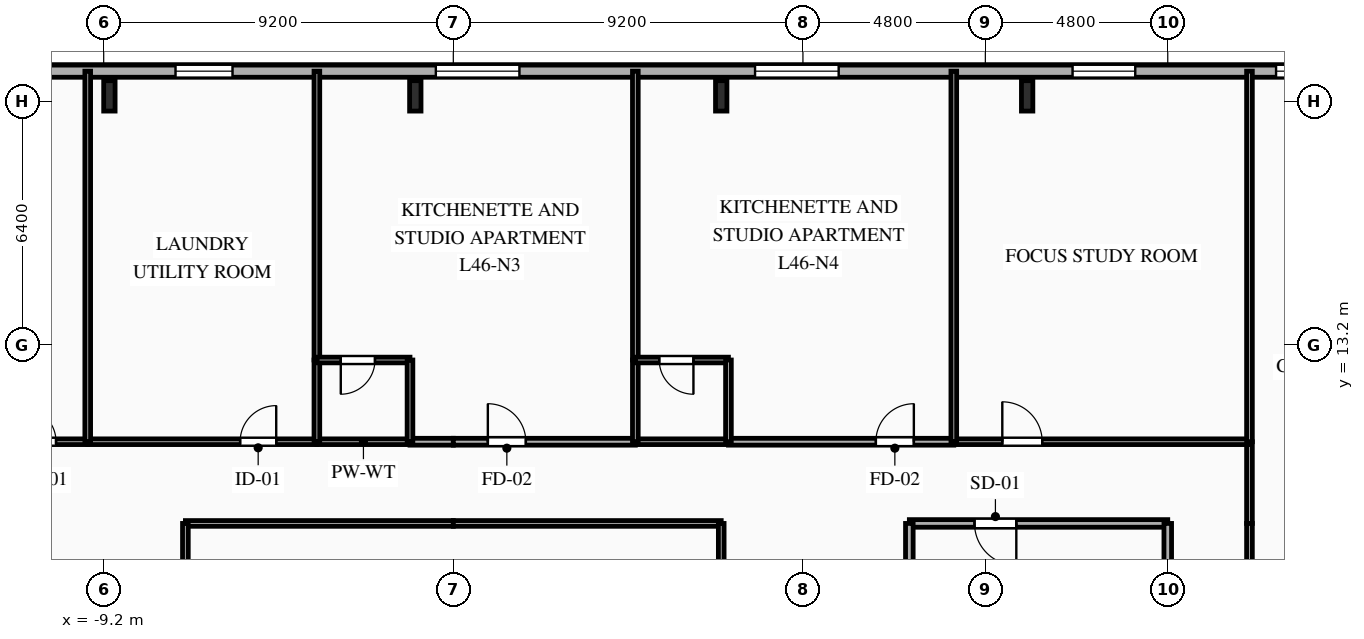
"""IFC4 building model, lengths in metres.
Left out: names, types, materials, properties, quantities, classifications, styles, units other than length and angle.
Written with IfcOpenShell. Run it as: python <this file> out.ifc"""

import sys

from ifc_helpers import new_model, si_unit, direction, frame, frame_2d, origin, origin_2d, place, context, subcontext, project, spatial, rectangle, i_section, extrude, element, fill, save


model = new_model("IFC4")
c1 = context("Model", 3, precision=1e-05, world=origin(), true_north=direction((0.0, 1.0)))
c2 = subcontext(c1, "Body", "Model", "MODEL_VIEW")
j1 = project(units=[si_unit("LENGTHUNIT", "METRE"), si_unit("PLANEANGLEUNIT", "RADIAN")], contexts=[c1])
p1 = place(None, origin())
s1 = spatial("IfcSite", under=j1, at=p1, CompositionType="ELEMENT")
p2 = place(p1, origin())
s2 = spatial("IfcBuilding", under=s1, at=p2, CompositionType="ELEMENT")
p3 = place(p2, frame((0.0, 0.0, 164.5)))
s3 = spatial("IfcBuildingStorey", under=s2, at=p3, CompositionType="ELEMENT", Elevation=164.5)
for number, where, z_axis, x_axis in (
    (1, (15.1, 19.75, 0.0), (0.0, 0.0, 1.0), (1.0, 0.0, 0.0)),
    (2, (7.05, 19.75, 0.0), (0.0, 0.0, 1.0), (1.0, 0.0, 0.0)),
    (3, (-1.0, 19.75, 0.0), (0.0, 0.0, 1.0), (1.0, 0.0, 0.0)),
    (4, (-9.05, 19.75, 0.0), (0.0, 0.0, 1.0), (1.0, 0.0, 0.0)),
):
    element("IfcColumn", number, at=place(p3, frame(where, z_axis=z_axis, x_axis=x_axis)), inside=s3, PredefinedType="COLUMN", context=c2, shape_type="SweptSolid", body=[
        extrude(i_section(OverallWidth=0.3, OverallDepth=0.8, WebThickness=0.018, FlangeThickness=0.033, FilletRadius=0.03, at=origin_2d()), origin(), (0.0, 0.0, 1.0), 3.35),
    ])
p4 = place(p3, frame((-25.8, 20.4, 0.0), z_axis=(0.0, 0.0, 1.0), x_axis=(1.0, 0.0, 0.0)))
e5 = element("IfcWall", 5, at=p4, inside=s3, PredefinedType="SOLIDWALL", context=c2, shape_type="SweptSolid", body=[
    extrude(rectangle(XDim=49.6, YDim=0.32, at=frame_2d((24.8, 0.0))), origin(), (0.0, 0.0, 1.0), 3.04),
])
p5 = place(p4, frame((2.135, 0.0, 0.85)))
e6 = element("IfcOpeningElement", 6, at=p5, cuts=e5, PredefinedType="OPENING", context=c2, shape_type="SweptSolid", body=[
    extrude(rectangle(XDim=1.65, YDim=1.85, at=frame_2d((0.825, 0.925))), frame((0.0, 0.17, 0.0), z_axis=(0.0, -1.0, 0.0), x_axis=(1.0, 0.0, 0.0)), (0.0, 0.0, 1.0), 0.34),
])
p6 = place(p4, frame((6.295, 0.0, 0.85)))
e7 = element("IfcOpeningElement", 7, at=p6, cuts=e5, PredefinedType="OPENING", context=c2, shape_type="SweptSolid", body=[
    extrude(rectangle(XDim=1.65, YDim=1.85, at=frame_2d((0.825, 0.925))), frame((0.0, 0.17, 0.0), z_axis=(0.0, -1.0, 0.0), x_axis=(1.0, 0.0, 0.0)), (0.0, 0.0, 1.0), 0.34),
])
p7 = place(p4, frame((10.775, 0.0, 0.85)))
e8 = element("IfcOpeningElement", 8, at=p7, cuts=e5, PredefinedType="OPENING", context=c2, shape_type="SweptSolid", body=[
    extrude(rectangle(XDim=1.65, YDim=1.85, at=frame_2d((0.825, 0.925))), frame((0.0, 0.17, 0.0), z_axis=(0.0, -1.0, 0.0), x_axis=(1.0, 0.0, 0.0)), (0.0, 0.0, 1.0), 0.34),
])
p8 = place(p4, frame((18.49, 0.0, 0.85)))
e9 = element("IfcOpeningElement", 9, at=p8, cuts=e5, PredefinedType="OPENING", context=c2, shape_type="SweptSolid", body=[
    extrude(rectangle(XDim=1.5, YDim=1.85, at=frame_2d((0.75, 0.925))), frame((0.0, 0.17, 0.0), z_axis=(0.0, -1.0, 0.0), x_axis=(1.0, 0.0, 0.0)), (0.0, 0.0, 1.0), 0.34),
])
p9 = place(p4, frame((25.34, 0.0, 0.85)))
e10 = element("IfcOpeningElement", 10, at=p9, cuts=e5, PredefinedType="OPENING", context=c2, shape_type="SweptSolid", body=[
    extrude(rectangle(XDim=2.2, YDim=1.85, at=frame_2d((1.1, 0.925))), frame((0.0, 0.17, 0.0), z_axis=(0.0, -1.0, 0.0), x_axis=(1.0, 0.0, 0.0)), (0.0, 0.0, 1.0), 0.34),
])
p10 = place(p4, frame((33.74, 0.0, 0.85)))
e11 = element("IfcOpeningElement", 11, at=p10, cuts=e5, PredefinedType="OPENING", context=c2, shape_type="SweptSolid", body=[
    extrude(rectangle(XDim=2.2, YDim=1.85, at=frame_2d((1.1, 0.925))), frame((0.0, 0.17, 0.0), z_axis=(0.0, -1.0, 0.0), x_axis=(1.0, 0.0, 0.0)), (0.0, 0.0, 1.0), 0.34),
])
p11 = place(p4, frame((42.095, 0.0, 0.85)))
e12 = element("IfcOpeningElement", 12, at=p11, cuts=e5, PredefinedType="OPENING", context=c2, shape_type="SweptSolid", body=[
    extrude(rectangle(XDim=1.65, YDim=1.85, at=frame_2d((0.825, 0.925))), frame((0.0, 0.17, 0.0), z_axis=(0.0, -1.0, 0.0), x_axis=(1.0, 0.0, 0.0)), (0.0, 0.0, 1.0), 0.34),
])
p12 = place(p4, frame((47.45, 0.0, 0.85)))
e13 = element("IfcOpeningElement", 13, at=p12, cuts=e5, PredefinedType="OPENING", context=c2, shape_type="SweptSolid", body=[
    extrude(rectangle(XDim=1.1, YDim=1.85, at=frame_2d((0.55, 0.925))), frame((0.0, 0.17, 0.0), z_axis=(0.0, -1.0, 0.0), x_axis=(1.0, 0.0, 0.0)), (0.0, 0.0, 1.0), 0.34),
])
p13 = place(p3, frame((18.8, 8.5, 0.0), z_axis=(0.0, 0.0, 1.0), x_axis=(-1.0, 0.0, 0.0)))
e14 = element("IfcWall", 14, at=p13, inside=s3, PredefinedType="PARTITIONING", context=c2, shape_type="SweptSolid", body=[
    extrude(rectangle(XDim=6.8, YDim=0.2, at=frame_2d((3.4, 0.0))), origin(), (0.0, 0.0, 1.0), 3.04),
])
p14 = place(p13, frame((3.985, 0.0, 0.0)))
e15 = element("IfcOpeningElement", 15, at=p14, cuts=e14, PredefinedType="OPENING", context=c2, shape_type="SweptSolid", body=[
    extrude(rectangle(XDim=1.1, YDim=2.15, at=frame_2d((0.55, 1.075))), frame((0.0, 0.11, 0.0), z_axis=(0.0, -1.0, 0.0), x_axis=(1.0, 0.0, 0.0)), (0.0, 0.0, 1.0), 0.22),
])
p15 = place(p3, frame((18.8, 5.6, 0.0), z_axis=(0.0, 0.0, 1.0), x_axis=(0.0, 1.0, 0.0)))
e16 = element("IfcWall", 16, at=p15, inside=s3, PredefinedType="PARTITIONING", context=c2, shape_type="SweptSolid", body=[
    extrude(rectangle(XDim=2.9, YDim=0.2, at=frame_2d((1.45, 0.0))), origin(), (0.0, 0.0, 1.0), 2.525),
])
p16 = place(p3, frame((12.0, 8.5, 0.0), z_axis=(0.0, 0.0, 1.0), x_axis=(0.0, -1.0, 0.0)))
e17 = element("IfcWall", 17, at=p16, inside=s3, PredefinedType="PARTITIONING", context=c2, shape_type="SweptSolid", body=[
    extrude(rectangle(XDim=2.9, YDim=0.2, at=frame_2d((1.45, 0.0))), origin(), (0.0, 0.0, 1.0), 3.04),
])
p17 = place(p3, frame((-11.97, 10.65, 0.0), z_axis=(0.0, 0.0, 1.0), x_axis=(1.0, 0.0, 0.0)))
e18 = element("IfcWall", 18, at=p17, inside=s3, PredefinedType="PLUMBINGWALL", context=c2, shape_type="SweptSolid", body=[
    extrude(rectangle(XDim=2.35, YDim=0.15, at=frame_2d((1.175, 0.0))), origin(), (0.0, 0.0, 1.0), 3.04),
])
p18 = place(p17, frame((0.616, 0.0, 0.0)))
e19 = element("IfcOpeningElement", 19, at=p18, cuts=e18, PredefinedType="OPENING", context=c2, shape_type="SweptSolid", body=[
    extrude(rectangle(XDim=0.9, YDim=2.1, at=frame_2d((0.45, 1.05))), frame((0.0, 0.085, 0.0), z_axis=(0.0, -1.0, 0.0), x_axis=(1.0, 0.0, 0.0)), (0.0, 0.0, 1.0), 0.17),
])
p19 = place(p3, frame((-9.62, 10.65, 0.0), z_axis=(0.0, 0.0, 1.0), x_axis=(1.0, 0.0, 0.0)))
e20 = element("IfcWall", 20, at=p19, inside=s3, PredefinedType="PARTITIONING", context=c2, shape_type="SweptSolid", body=[
    extrude(rectangle(XDim=6.03, YDim=0.15, at=frame_2d((3.015, 0.0))), origin(), (0.0, 0.0, 1.0), 3.04),
])
p20 = place(p19, frame((4.01, 0.0, 0.0)))
e21 = element("IfcOpeningElement", 21, at=p20, cuts=e20, PredefinedType="OPENING", context=c2, shape_type="SweptSolid", body=[
    extrude(rectangle(XDim=0.95, YDim=2.1, at=frame_2d((0.475, 1.05))), frame((0.0, 0.085, 0.0), z_axis=(0.0, -1.0, 0.0), x_axis=(1.0, 0.0, 0.0)), (0.0, 0.0, 1.0), 0.17),
])
p21 = place(p3, frame((-1.14, 10.65, 0.0), z_axis=(0.0, 0.0, 1.0), x_axis=(1.0, 0.0, 0.0)))
e22 = element("IfcWall", 22, at=p21, inside=s3, PredefinedType="PARTITIONING", context=c2, shape_type="SweptSolid", body=[
    extrude(rectangle(XDim=1.14, YDim=0.18, at=frame_2d((0.57, 0.0))), origin(), (0.0, 0.0, 1.0), 3.04),
])
p22 = place(p3, frame((-3.59, 10.65, 0.0), z_axis=(0.0, 0.0, 1.0), x_axis=(1.0, 0.0, 0.0)))
e23 = element("IfcWall", 23, at=p22, inside=s3, PredefinedType="PLUMBINGWALL", context=c2, shape_type="SweptSolid", body=[
    extrude(rectangle(XDim=2.45, YDim=0.15, at=frame_2d((1.225, 0.0))), origin(), (0.0, 0.0, 1.0), 3.04),
])
p23 = place(p3, frame((0.0, 8.5, 0.0), z_axis=(0.0, 0.0, 1.0), x_axis=(-1.0, 0.0, 0.0)))
e24 = element("IfcWall", 24, at=p23, inside=s3, PredefinedType="PARTITIONING", context=c2, shape_type="SweptSolid", body=[
    extrude(rectangle(XDim=7.05, YDim=0.15, at=frame_2d((3.525, 0.0))), origin(), (0.0, 0.0, 1.0), 3.04),
])
p24 = place(p3, frame((20.95, 10.65, 0.0), z_axis=(0.0, 0.0, 1.0), x_axis=(0.0, -1.0, 0.0)))
e25 = element("IfcWall", 25, at=p24, inside=s3, PredefinedType="PARTITIONING", context=c2, shape_type="SweptSolid", body=[
    extrude(rectangle(XDim=2.15, YDim=0.15, at=frame_2d((1.075, 0.0))), origin(), (0.0, 0.0, 1.0), 3.04),
])
p25 = place(p3, frame((0.0, 10.65, 0.0), z_axis=(0.0, 0.0, 1.0), x_axis=(1.0, 0.0, 0.0)))
e26 = element("IfcWall", 26, at=p25, inside=s3, PredefinedType="PARTITIONING", context=c2, shape_type="SweptSolid", body=[
    extrude(rectangle(XDim=4.79, YDim=0.18, at=frame_2d((2.395, 0.0))), origin(), (0.0, 0.0, 1.0), 3.04),
])
p26 = place(p25, frame((0.909, 0.0, 0.0)))
e27 = element("IfcOpeningElement", 27, at=p26, cuts=e26, PredefinedType="OPENING", context=c2, shape_type="SweptSolid", body=[
    extrude(rectangle(XDim=1.0, YDim=2.15, at=frame_2d((0.5, 1.075))), frame((0.0, 0.1, 0.0), z_axis=(0.0, -1.0, 0.0), x_axis=(1.0, 0.0, 0.0)), (0.0, 0.0, 1.0), 0.2),
])
p27 = place(p3, frame((7.24, 10.65, 0.0), z_axis=(0.0, 0.0, 1.0), x_axis=(1.0, 0.0, 0.0)))
e28 = element("IfcWall", 28, at=p27, inside=s3, PredefinedType="PARTITIONING", context=c2, shape_type="SweptSolid", body=[
    extrude(rectangle(XDim=5.93, YDim=0.18, at=frame_2d((2.965, 0.0))), origin(), (0.0, 0.0, 1.0), 3.04),
])
p28 = place(p27, frame((3.879, 0.0, 0.0)))
e29 = element("IfcOpeningElement", 29, at=p28, cuts=e28, PredefinedType="OPENING", context=c2, shape_type="SweptSolid", body=[
    extrude(rectangle(XDim=1.0, YDim=2.15, at=frame_2d((0.5, 1.075))), frame((0.0, 0.1, 0.0), z_axis=(0.0, -1.0, 0.0), x_axis=(1.0, 0.0, 0.0)), (0.0, 0.0, 1.0), 0.2),
])
p29 = place(p3, frame((4.79, 10.65, 0.0), z_axis=(0.0, 0.0, 1.0), x_axis=(1.0, 0.0, 0.0)))
e30 = element("IfcWall", 30, at=p29, inside=s3, PredefinedType="PLUMBINGWALL", context=c2, shape_type="SweptSolid", body=[
    extrude(rectangle(XDim=2.45, YDim=0.15, at=frame_2d((1.225, 0.0))), origin(), (0.0, 0.0, 1.0), 3.04),
])
p30 = place(p3, frame((13.17, 10.65, 0.0), z_axis=(0.0, 0.0, 1.0), x_axis=(1.0, 0.0, 0.0)))
e31 = element("IfcWall", 31, at=p30, inside=s3, PredefinedType="PARTITIONING", context=c2, shape_type="SweptSolid", body=[
    extrude(rectangle(XDim=7.78, YDim=0.15, at=frame_2d((3.89, 0.0))), origin(), (0.0, 0.0, 1.0), 3.04),
])
p31 = place(p30, frame((1.276, 0.0, 0.0)))
e32 = element("IfcOpeningElement", 32, at=p31, cuts=e31, PredefinedType="OPENING", context=c2, shape_type="SweptSolid", body=[
    extrude(rectangle(XDim=1.05, YDim=2.15, at=frame_2d((0.525, 1.075))), frame((0.0, 0.085, 0.0), z_axis=(0.0, -1.0, 0.0), x_axis=(1.0, 0.0, 0.0)), (0.0, 0.0, 1.0), 0.17),
])
p32 = place(p3, frame((7.05, 8.5, 0.0), z_axis=(0.0, 0.0, 1.0), x_axis=(-1.0, 0.0, 0.0)))
e33 = element("IfcWall", 33, at=p32, inside=s3, PredefinedType="PARTITIONING", context=c2, shape_type="SweptSolid", body=[
    extrude(rectangle(XDim=7.05, YDim=0.15, at=frame_2d((3.525, 0.0))), origin(), (0.0, 0.0, 1.0), 3.04),
])
p33 = place(p3, frame((20.95, 8.5, 0.0), z_axis=(0.0, 0.0, 1.0), x_axis=(0.0, -1.0, 0.0)))
e34 = element("IfcWall", 34, at=p33, inside=s3, PredefinedType="PARTITIONING", context=c2, shape_type="SweptSolid", body=[
    extrude(rectangle(XDim=6.1, YDim=0.15, at=frame_2d((3.05, 0.0))), origin(), (0.0, 0.0, 1.0), 3.04),
])
p34 = place(p33, frame((3.984, 0.0, 0.0)))
e35 = element("IfcOpeningElement", 35, at=p34, cuts=e34, PredefinedType="OPENING", context=c2, shape_type="SweptSolid", body=[
    extrude(rectangle(XDim=1.05, YDim=2.15, at=frame_2d((0.525, 1.075))), frame((0.0, 0.085, 0.0), z_axis=(0.0, -1.0, 0.0), x_axis=(1.0, 0.0, 0.0)), (0.0, 0.0, 1.0), 0.17),
])
for number, where, z_axis, x_axis in (
    (36, (-7.05, 8.5, 0.0), (0.0, 0.0, 1.0), (0.0, -1.0, 0.0)),
    (37, (7.05, -0.8, 0.0), (0.0, 0.0, 1.0), (0.0, 1.0, 0.0)),
):
    element("IfcWall", number, at=place(p3, frame(where, z_axis=z_axis, x_axis=x_axis)), inside=s3, PredefinedType="PARTITIONING", context=c2, shape_type="SweptSolid", body=[
        extrude(rectangle(XDim=9.3, YDim=0.15, at=frame_2d((4.65, 0.0))), origin(), (0.0, 0.0, 1.0), 3.04),
    ])
p35 = place(p3, frame((20.95, 10.65, 0.0), z_axis=(0.0, 0.0, 1.0), x_axis=(0.0, 1.0, 0.0)))
e38 = element("IfcWall", 38, at=p35, inside=s3, PredefinedType="PARTITIONING", context=c2, shape_type="SweptSolid", body=[
    extrude(rectangle(XDim=9.75, YDim=0.15, at=frame_2d((4.875, 0.0))), origin(), (0.0, 0.0, 1.0), 2.525),
])
p36 = place(p3, frame((-9.62, 20.4, 0.0), z_axis=(0.0, 0.0, 1.0), x_axis=(0.0, -1.0, 0.0)))
e39 = element("IfcWall", 39, at=p36, inside=s3, PredefinedType="PLUMBINGWALL", context=c2, shape_type="SweptSolid", body=[
    extrude(rectangle(XDim=9.75, YDim=0.15, at=frame_2d((4.875, 0.0))), origin(), (0.0, 0.0, 1.0), 3.04),
])
p37 = place(p3, frame((-3.59, 20.4, 0.0), z_axis=(0.0, 0.0, 1.0), x_axis=(0.0, -1.0, 0.0)))
e40 = element("IfcWall", 40, at=p37, inside=s3, PredefinedType="PARTITIONING", context=c2, shape_type="SweptSolid", body=[
    extrude(rectangle(XDim=7.6, YDim=0.15, at=frame_2d((3.8, 0.0))), origin(), (0.0, 0.0, 1.0), 3.04),
])
p38 = place(p3, frame((-3.59, 12.8, 0.0), z_axis=(0.0, 0.0, 1.0), x_axis=(0.0, -1.0, 0.0)))
e41 = element("IfcWall", 41, at=p38, inside=s3, PredefinedType="PLUMBINGWALL", context=c2, shape_type="SweptSolid", body=[
    extrude(rectangle(XDim=2.15, YDim=0.15, at=frame_2d((1.075, 0.0))), origin(), (0.0, 0.0, 1.0), 3.04),
])
p39 = place(p3, frame((-1.14, 12.8, 0.0), z_axis=(0.0, 0.0, 1.0), x_axis=(-1.0, 0.0, 0.0)))
e42 = element("IfcWall", 42, at=p39, inside=s3, PredefinedType="PLUMBINGWALL", context=c2, shape_type="SweptSolid", body=[
    extrude(rectangle(XDim=2.45, YDim=0.15, at=frame_2d((1.225, 0.0))), origin(), (0.0, 0.0, 1.0), 3.04),
])
p40 = place(p39, frame((0.921, 0.0, 0.0)))
e43 = element("IfcOpeningElement", 43, at=p40, cuts=e42, PredefinedType="OPENING", context=c2, shape_type="SweptSolid", body=[
    extrude(rectangle(XDim=0.9, YDim=2.1, at=frame_2d((0.45, 1.05))), frame((0.0, 0.085, 0.0), z_axis=(0.0, -1.0, 0.0), x_axis=(1.0, 0.0, 0.0)), (0.0, 0.0, 1.0), 0.17),
])
p41 = place(p3, frame((-1.14, 10.65, 0.0), z_axis=(0.0, 0.0, 1.0), x_axis=(0.0, 1.0, 0.0)))
e44 = element("IfcWall", 44, at=p41, inside=s3, PredefinedType="PLUMBINGWALL", context=c2, shape_type="SweptSolid", body=[
    extrude(rectangle(XDim=2.15, YDim=0.15, at=frame_2d((1.075, 0.0))), origin(), (0.0, 0.0, 1.0), 3.04),
])
p42 = place(p3, frame((4.79, 20.4, 0.0), z_axis=(0.0, 0.0, 1.0), x_axis=(0.0, -1.0, 0.0)))
e45 = element("IfcWall", 45, at=p42, inside=s3, PredefinedType="PARTITIONING", context=c2, shape_type="SweptSolid", body=[
    extrude(rectangle(XDim=7.6, YDim=0.15, at=frame_2d((3.8, 0.0))), origin(), (0.0, 0.0, 1.0), 3.04),
])
p43 = place(p3, frame((4.79, 12.8, 0.0), z_axis=(0.0, 0.0, 1.0), x_axis=(0.0, -1.0, 0.0)))
e46 = element("IfcWall", 46, at=p43, inside=s3, PredefinedType="PLUMBINGWALL", context=c2, shape_type="SweptSolid", body=[
    extrude(rectangle(XDim=2.15, YDim=0.15, at=frame_2d((1.075, 0.0))), origin(), (0.0, 0.0, 1.0), 3.04),
])
p44 = place(p3, frame((7.24, 12.8, 0.0), z_axis=(0.0, 0.0, 1.0), x_axis=(-1.0, 0.0, 0.0)))
e47 = element("IfcWall", 47, at=p44, inside=s3, PredefinedType="PLUMBINGWALL", context=c2, shape_type="SweptSolid", body=[
    extrude(rectangle(XDim=2.45, YDim=0.15, at=frame_2d((1.225, 0.0))), origin(), (0.0, 0.0, 1.0), 3.04),
])
p45 = place(p44, frame((0.921, 0.0, 0.0)))
e48 = element("IfcOpeningElement", 48, at=p45, cuts=e47, PredefinedType="OPENING", context=c2, shape_type="SweptSolid", body=[
    extrude(rectangle(XDim=0.9, YDim=2.1, at=frame_2d((0.45, 1.05))), frame((0.0, 0.085, 0.0), z_axis=(0.0, -1.0, 0.0), x_axis=(1.0, 0.0, 0.0)), (0.0, 0.0, 1.0), 0.17),
])
p46 = place(p3, frame((7.24, 10.65, 0.0), z_axis=(0.0, 0.0, 1.0), x_axis=(0.0, 1.0, 0.0)))
e49 = element("IfcWall", 49, at=p46, inside=s3, PredefinedType="PLUMBINGWALL", context=c2, shape_type="SweptSolid", body=[
    extrude(rectangle(XDim=2.15, YDim=0.15, at=frame_2d((1.075, 0.0))), origin(), (0.0, 0.0, 1.0), 3.04),
])
p47 = place(p3, frame((13.17, 20.4, 0.0), z_axis=(0.0, 0.0, 1.0), x_axis=(0.0, -1.0, 0.0)))
e50 = element("IfcWall", 50, at=p47, inside=s3, PredefinedType="PARTITIONING", context=c2, shape_type="SweptSolid", body=[
    extrude(rectangle(XDim=9.75, YDim=0.15, at=frame_2d((4.875, 0.0))), origin(), (0.0, 0.0, 1.0), 3.04),
])
p48 = place(p8, origin())
e51 = element("IfcWindow", 51, at=p48, inside=s3, PartitioningType="SINGLE_PANEL", PredefinedType="WINDOW", context=c2, shape_type="SweptSolid", body=[
    extrude(rectangle(XDim=1.5, YDim=1.85, at=frame_2d((0.75, 0.925))), frame((0.0, 0.03, 0.0), z_axis=(0.0, -1.0, 0.0), x_axis=(1.0, 0.0, 0.0)), (0.0, 0.0, 1.0), 0.06),
])
fill(e9, e51)
p49 = place(p9, origin())
e52 = element("IfcWindow", 52, at=p49, inside=s3, PartitioningType="SINGLE_PANEL", PredefinedType="WINDOW", context=c2, shape_type="SweptSolid", body=[
    extrude(rectangle(XDim=2.2, YDim=1.85, at=frame_2d((1.1, 0.925))), frame((0.0, 0.03, 0.0), z_axis=(0.0, -1.0, 0.0), x_axis=(1.0, 0.0, 0.0)), (0.0, 0.0, 1.0), 0.06),
])
fill(e10, e52)
p50 = place(p10, origin())
e53 = element("IfcWindow", 53, at=p50, inside=s3, PartitioningType="SINGLE_PANEL", PredefinedType="WINDOW", context=c2, shape_type="SweptSolid", body=[
    extrude(rectangle(XDim=2.2, YDim=1.85, at=frame_2d((1.1, 0.925))), frame((0.0, 0.03, 0.0), z_axis=(0.0, -1.0, 0.0), x_axis=(1.0, 0.0, 0.0)), (0.0, 0.0, 1.0), 0.06),
])
fill(e11, e53)
p51 = place(p11, origin())
e54 = element("IfcWindow", 54, at=p51, inside=s3, PartitioningType="SINGLE_PANEL", PredefinedType="WINDOW", context=c2, shape_type="SweptSolid", body=[
    extrude(rectangle(XDim=1.65, YDim=1.85, at=frame_2d((0.825, 0.925))), frame((0.0, 0.03, 0.0), z_axis=(0.0, -1.0, 0.0), x_axis=(1.0, 0.0, 0.0)), (0.0, 0.0, 1.0), 0.06),
])
fill(e12, e54)
p52 = place(p12, origin())
e55 = element("IfcWindow", 55, at=p52, inside=s3, PartitioningType="SINGLE_PANEL", PredefinedType="WINDOW", context=c2, shape_type="SweptSolid", body=[
    extrude(rectangle(XDim=1.1, YDim=1.85, at=frame_2d((0.55, 0.925))), frame((0.0, 0.03, 0.0), z_axis=(0.0, -1.0, 0.0), x_axis=(1.0, 0.0, 0.0)), (0.0, 0.0, 1.0), 0.06),
])
fill(e13, e55)
p53 = place(p14, origin())
e56 = element("IfcDoor", 56, at=p53, inside=s3, OperationType="SINGLE_SWING_LEFT", PredefinedType="DOOR", context=c2, shape_type="SweptSolid", body=[
    extrude(rectangle(XDim=1.1, YDim=2.15, at=frame_2d((0.55, 1.075))), frame((0.0, 0.025, 0.0), z_axis=(0.0, -1.0, 0.0), x_axis=(1.0, 0.0, 0.0)), (0.0, 0.0, 1.0), 0.05),
])
fill(e15, e56)
p54 = place(p18, origin())
e57 = element("IfcDoor", 57, at=p54, inside=s3, OperationType="SINGLE_SWING_LEFT", PredefinedType="DOOR", context=c2, shape_type="SweptSolid", body=[
    extrude(rectangle(XDim=0.9, YDim=2.1, at=frame_2d((0.45, 1.05))), frame((0.0, 0.025, 0.0), z_axis=(0.0, -1.0, 0.0), x_axis=(1.0, 0.0, 0.0)), (0.0, 0.0, 1.0), 0.05),
])
fill(e19, e57)
p55 = place(p20, origin())
e58 = element("IfcDoor", 58, at=p55, inside=s3, OperationType="SINGLE_SWING_RIGHT", PredefinedType="DOOR", context=c2, shape_type="SweptSolid", body=[
    extrude(rectangle(XDim=0.95, YDim=2.1, at=frame_2d((0.475, 1.05))), frame((0.0, 0.025, 0.0), z_axis=(0.0, -1.0, 0.0), x_axis=(1.0, 0.0, 0.0)), (0.0, 0.0, 1.0), 0.05),
])
fill(e21, e58)
p56 = place(p26, origin())
e59 = element("IfcDoor", 59, at=p56, inside=s3, OperationType="SINGLE_SWING_LEFT", PredefinedType="DOOR", context=c2, shape_type="SweptSolid", body=[
    extrude(rectangle(XDim=1.0, YDim=2.15, at=frame_2d((0.5, 1.075))), frame((0.0, 0.025, 0.0), z_axis=(0.0, -1.0, 0.0), x_axis=(1.0, 0.0, 0.0)), (0.0, 0.0, 1.0), 0.05),
])
fill(e27, e59)
p57 = place(p28, origin())
e60 = element("IfcDoor", 60, at=p57, inside=s3, OperationType="SINGLE_SWING_RIGHT", PredefinedType="DOOR", context=c2, shape_type="SweptSolid", body=[
    extrude(rectangle(XDim=1.0, YDim=2.15, at=frame_2d((0.5, 1.075))), frame((0.0, 0.025, 0.0), z_axis=(0.0, -1.0, 0.0), x_axis=(1.0, 0.0, 0.0)), (0.0, 0.0, 1.0), 0.05),
])
fill(e29, e60)
p58 = place(p31, origin())
e61 = element("IfcDoor", 61, at=p58, inside=s3, OperationType="SINGLE_SWING_LEFT", PredefinedType="DOOR", context=c2, shape_type="SweptSolid", body=[
    extrude(rectangle(XDim=1.05, YDim=2.15, at=frame_2d((0.525, 1.075))), frame((0.0, 0.025, 0.0), z_axis=(0.0, -1.0, 0.0), x_axis=(1.0, 0.0, 0.0)), (0.0, 0.0, 1.0), 0.05),
])
fill(e32, e61)
p59 = place(p40, origin())
e62 = element("IfcDoor", 62, at=p59, inside=s3, OperationType="SINGLE_SWING_RIGHT", PredefinedType="DOOR", context=c2, shape_type="SweptSolid", body=[
    extrude(rectangle(XDim=0.9, YDim=2.1, at=frame_2d((0.45, 1.05))), frame((0.0, 0.025, 0.0), z_axis=(0.0, -1.0, 0.0), x_axis=(1.0, 0.0, 0.0)), (0.0, 0.0, 1.0), 0.05),
])
fill(e43, e62)
p60 = place(p45, origin())
e63 = element("IfcDoor", 63, at=p60, inside=s3, OperationType="SINGLE_SWING_LEFT", PredefinedType="DOOR", context=c2, shape_type="SweptSolid", body=[
    extrude(rectangle(XDim=0.9, YDim=2.1, at=frame_2d((0.45, 1.05))), frame((0.0, 0.025, 0.0), z_axis=(0.0, -1.0, 0.0), x_axis=(1.0, 0.0, 0.0)), (0.0, 0.0, 1.0), 0.05),
])
fill(e48, e63)
save(model, sys.argv[1])
